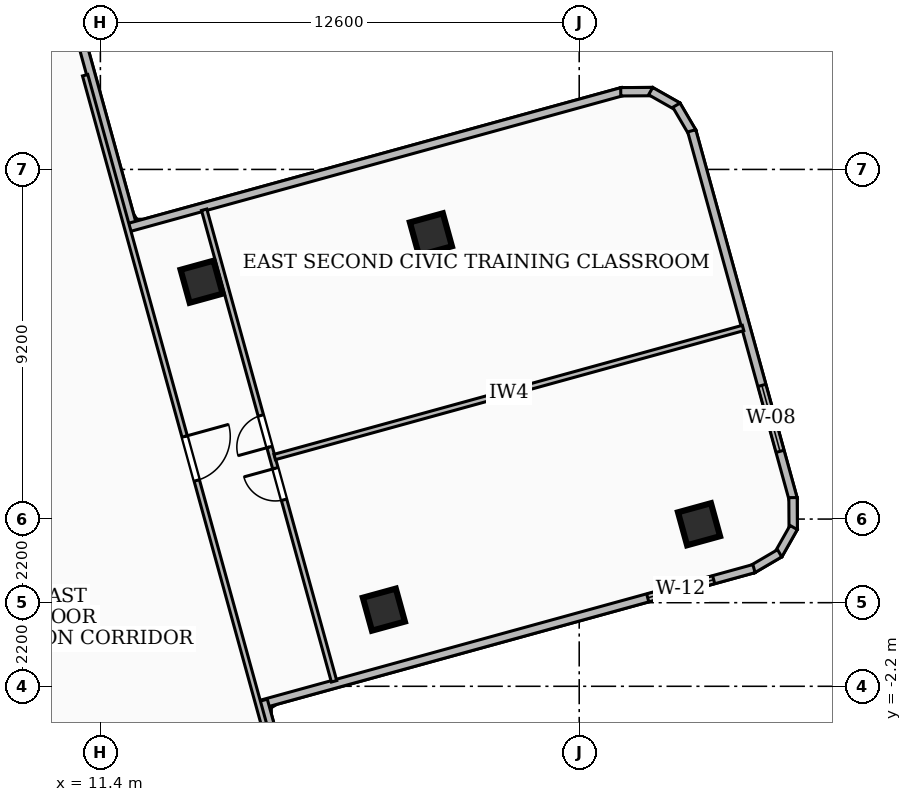
"""IFC4 building model, lengths in metres.
Left out: names, types, materials, properties, quantities, classifications, styles, units other than length and angle.
Written with IfcOpenShell. Run it as: python <this file> out.ifc"""

import sys

from ifc_helpers import new_model, si_unit, direction, frame, frame_2d, origin, origin_2d, place, context, subcontext, project, spatial, rectangle, extrude, element, fill, save


model = new_model("IFC4")
c1 = context("Model", 3, precision=1e-05, world=origin(), true_north=direction((0.0, 1.0)))
c2 = subcontext(c1, "Body", "Model", "MODEL_VIEW")
j1 = project(units=[si_unit("LENGTHUNIT", "METRE"), si_unit("PLANEANGLEUNIT", "RADIAN")], contexts=[c1])
p1 = place(None, origin())
s1 = spatial("IfcSite", under=j1, at=p1, CompositionType="ELEMENT")
p2 = place(p1, origin())
s2 = spatial("IfcBuilding", under=s1, at=p2, CompositionType="ELEMENT")
p3 = place(p2, frame((0.0, 0.0, 137.88)))
s3 = spatial("IfcBuildingStorey", under=s2, at=p3, CompositionType="ELEMENT", Elevation=137.88)
for number, where, z_axis, x_axis in (
    (1, (18.86, -0.183, 0.0), (0.0, 0.0, 1.0), (0.964, 0.266, 0.0)),
    (2, (14.064, 8.445, 0.0), (0.0, 0.0, 1.0), (0.964, 0.266, 0.0)),
    (3, (27.153, 2.064, 0.0), (0.0, 0.0, 1.0), (0.964, 0.266, 0.0)),
    (4, (20.098, 9.692, 0.0), (0.0, 0.0, 1.0), (0.964, 0.266, 0.0)),
):
    element("IfcColumn", number, at=place(p3, frame(where, z_axis=z_axis, x_axis=x_axis)), inside=s3, PredefinedType="COLUMN", context=c2, shape_type="SweptSolid", body=[
        extrude(rectangle(XDim=0.9, YDim=0.9, at=origin_2d()), origin(), (0.0, 0.0, 1.0), 3.6),
    ])
p4 = place(p3, frame((10.479, 16.33, 0.0), z_axis=(0.0, 0.0, 1.0), x_axis=(0.265567840793, -0.964092175021, 0.0)))
e5 = element("IfcWall", 5, at=p4, inside=s3, PredefinedType="SOLIDWALL", context=c2, shape_type="SweptSolid", body=[
    extrude(rectangle(XDim=6.759, YDim=0.22, at=frame_2d((3.379, 0.0))), origin(), (0.0, 0.0, 1.0), 2.624),
])
p5 = place(p3, frame((12.166, 9.876, 0.0), z_axis=(0.0, 0.0, 1.0), x_axis=(0.964099811745, 0.2655401156, 0.0)))
e6 = element("IfcWall", 6, at=p5, inside=s3, PredefinedType="SOLIDWALL", context=c2, shape_type="SweptSolid", body=[
    extrude(rectangle(XDim=13.459, YDim=0.22, at=frame_2d((6.729, 0.0))), origin(), (0.0, 0.0, 1.0), 2.624),
])
p6 = place(p3, frame((25.093, 13.443, 0.0), z_axis=(0.0, 0.0, 1.0), x_axis=(0.999982861094, 0.005854700592, 0.0)))
e7 = element("IfcWall", 7, at=p6, inside=s3, PredefinedType="SOLIDWALL", context=c2, shape_type="SweptSolid", body=[
    extrude(rectangle(XDim=0.834, YDim=0.22, at=frame_2d((0.417, 0.0))), origin(), (0.0, 0.0, 1.0), 3.32),
])
p7 = place(p3, frame((25.88, 13.46, 0.0), z_axis=(0.0, 0.0, 1.0), x_axis=(0.87005199541, -0.492959963164, 0.0)))
e8 = element("IfcWall", 8, at=p7, inside=s3, PredefinedType="SOLIDWALL", context=c2, shape_type="SweptSolid", body=[
    extrude(rectangle(XDim=0.82, YDim=0.22, at=frame_2d((0.41, 0.0))), origin(), (0.0, 0.0, 1.0), 3.32),
])
p8 = place(p3, frame((26.558, 13.09, 0.0), z_axis=(0.0, 0.0, 1.0), x_axis=(0.506432207312, -0.862279780232, 0.0)))
e9 = element("IfcWall", 9, at=p8, inside=s3, PredefinedType="SOLIDWALL", context=c2, shape_type="SweptSolid", body=[
    extrude(rectangle(XDim=0.835, YDim=0.22, at=frame_2d((0.417, 0.0))), origin(), (0.0, 0.0, 1.0), 3.32),
])
p9 = place(p3, frame((26.961, 12.416, 0.0), z_axis=(0.0, 0.0, 1.0), x_axis=(0.265584520086, -0.964087580405, 0.0)))
e10 = element("IfcWall", 10, at=p9, inside=s3, PredefinedType="SOLIDWALL", context=c2, shape_type="SweptSolid", body=[
    extrude(rectangle(XDim=10.061, YDim=0.22, at=frame_2d((5.031, 0.0))), origin(), (0.0, 0.0, 1.0), 3.32),
])
p10 = place(p9, frame((6.948, 0.0, 0.85)))
e11 = element("IfcOpeningElement", 11, at=p10, cuts=e10, PredefinedType="OPENING", context=c2, shape_type="SweptSolid", body=[
    extrude(rectangle(XDim=1.8, YDim=1.8, at=frame_2d((0.9, 0.9))), frame((0.0, 0.12, 0.0), z_axis=(0.0, -1.0, 0.0), x_axis=(1.0, 0.0, 0.0)), (0.0, 0.0, 1.0), 0.24),
])
p11 = place(p3, frame((29.626, 2.765, 0.0), z_axis=(0.0, 0.0, 1.0), x_axis=(0.006147424822, -0.999981104406, 0.0)))
e12 = element("IfcWall", 12, at=p11, inside=s3, PredefinedType="SOLIDWALL", context=c2, shape_type="SweptSolid", body=[
    extrude(rectangle(XDim=0.834, YDim=0.22, at=frame_2d((0.417, 0.0))), origin(), (0.0, 0.0, 1.0), 3.32),
])
p12 = place(p3, frame((29.643, 1.978, 0.0), z_axis=(0.0, 0.0, 1.0), x_axis=(-0.492057256668, -0.87056283872, 0.0)))
e13 = element("IfcWall", 13, at=p12, inside=s3, PredefinedType="SOLIDWALL", context=c2, shape_type="SweptSolid", body=[
    extrude(rectangle(XDim=0.819, YDim=0.22, at=frame_2d((0.41, 0.0))), origin(), (0.0, 0.0, 1.0), 3.32),
])
p13 = place(p3, frame((29.274, 1.3, 0.0), z_axis=(0.0, 0.0, 1.0), x_axis=(-0.862451814289, -0.506139178517, 0.0)))
e14 = element("IfcWall", 14, at=p13, inside=s3, PredefinedType="SOLIDWALL", context=c2, shape_type="SweptSolid", body=[
    extrude(rectangle(XDim=0.836, YDim=0.22, at=frame_2d((0.418, 0.0))), origin(), (0.0, 0.0, 1.0), 3.32),
])
p14 = place(p3, frame((28.599, 0.897, 0.0), z_axis=(0.0, 0.0, 1.0), x_axis=(-0.964113270695, -0.265491245185, 0.0)))
e15 = element("IfcWall", 15, at=p14, inside=s3, PredefinedType="SOLIDWALL", context=c2, shape_type="SweptSolid", body=[
    extrude(rectangle(XDim=13.458, YDim=0.22, at=frame_2d((6.729, 0.0))), origin(), (0.0, 0.0, 1.0), 3.32),
])
p15 = place(p14, frame((1.1, 0.0, 0.85)))
e16 = element("IfcOpeningElement", 16, at=p15, cuts=e15, PredefinedType="OPENING", context=c2, shape_type="SweptSolid", body=[
    extrude(rectangle(XDim=1.8, YDim=1.6, at=frame_2d((0.9, 0.8))), frame((0.0, 0.12, 0.0), z_axis=(0.0, -1.0, 0.0), x_axis=(1.0, 0.0, 0.0)), (0.0, 0.0, 1.0), 0.24),
])
p16 = place(p3, frame((15.686, -2.568, 0.0), z_axis=(0.0, 0.0, 1.0), x_axis=(0.265558779784, -0.964094670911, 0.0)))
e17 = element("IfcWall", 17, at=p16, inside=s3, PredefinedType="SOLIDWALL", context=c2, shape_type="SweptSolid", body=[
    extrude(rectangle(XDim=6.319, YDim=0.22, at=frame_2d((3.159, 0.0))), origin(), (0.0, 0.0, 1.0), 3.32),
])
p17 = place(p3, frame((10.999, 13.879, 0.0), z_axis=(0.0, 0.0, 1.0), x_axis=(0.26558288107, -0.964088031915, 0.0)))
e18 = element("IfcWall", 18, at=p17, inside=s3, PredefinedType="PARTITIONING", context=c2, shape_type="SweptSolid", body=[
    extrude(rectangle(XDim=20.479, YDim=0.145, at=frame_2d((10.24, 0.0))), origin(), (0.0, 0.0, 1.0), 2.55),
])
p18 = place(p17, frame((9.86, 0.0, 0.0)))
e19 = element("IfcOpeningElement", 19, at=p18, cuts=e18, PredefinedType="OPENING", context=c2, shape_type="SweptSolid", body=[
    extrude(rectangle(XDim=1.2, YDim=2.1, at=frame_2d((0.6, 1.05))), frame((0.0, 0.083, 0.0), z_axis=(0.0, -1.0, 0.0), x_axis=(1.0, 0.0, 0.0)), (0.0, 0.0, 1.0), 0.165),
])
p19 = place(p3, frame((15.986, 3.833, 0.0), z_axis=(0.0, 0.0, 1.0), x_axis=(0.964097539176, 0.265548366506, 0.0)))
e20 = element("IfcWall", 20, at=p19, inside=s3, PredefinedType="PARTITIONING", context=c2, shape_type="SweptSolid", body=[
    extrude(rectangle(XDim=12.785, YDim=0.145, at=frame_2d((6.393, 0.0))), origin(), (0.0, 0.0, 1.0), 2.812),
])
p20 = place(p3, frame((17.549, -2.069, 0.0), z_axis=(0.0, 0.0, 1.0), x_axis=(-0.265569130282, 0.964091819819, 0.0)))
e21 = element("IfcWall", 21, at=p20, inside=s3, PredefinedType="PARTITIONING", context=c2, shape_type="SweptSolid", body=[
    extrude(rectangle(XDim=12.87, YDim=0.145, at=frame_2d((6.435, 0.0))), origin(), (0.0, 0.0, 1.0), 2.55),
])
p21 = place(p20, frame((4.955, 0.0, 0.0)))
e22 = element("IfcOpeningElement", 22, at=p21, cuts=e21, PredefinedType="OPENING", context=c2, shape_type="SweptSolid", body=[
    extrude(rectangle(XDim=0.86, YDim=2.04, at=frame_2d((0.43, 1.02))), frame((0.0, 0.083, 0.0), z_axis=(0.0, -1.0, 0.0), x_axis=(1.0, 0.0, 0.0)), (0.0, 0.0, 1.0), 0.165),
])
p22 = place(p20, frame((6.395, 0.0, 0.0)))
e23 = element("IfcOpeningElement", 23, at=p22, cuts=e21, PredefinedType="OPENING", context=c2, shape_type="SweptSolid", body=[
    extrude(rectangle(XDim=0.86, YDim=2.04, at=frame_2d((0.43, 1.02))), frame((0.0, 0.083, 0.0), z_axis=(0.0, -1.0, 0.0), x_axis=(1.0, 0.0, 0.0)), (0.0, 0.0, 1.0), 0.165),
])
p23 = place(p10, origin())
e24 = element("IfcWindow", 24, at=p23, inside=s3, PartitioningType="SINGLE_PANEL", PredefinedType="WINDOW", context=c2, shape_type="SweptSolid", body=[
    extrude(rectangle(XDim=1.8, YDim=1.8, at=frame_2d((0.9, 0.9))), frame((0.0, 0.03, 0.0), z_axis=(0.0, -1.0, 0.0), x_axis=(1.0, 0.0, 0.0)), (0.0, 0.0, 1.0), 0.06),
])
fill(e11, e24)
p24 = place(p15, origin())
e25 = element("IfcWindow", 25, at=p24, inside=s3, PartitioningType="SINGLE_PANEL", PredefinedType="WINDOW", context=c2, shape_type="SweptSolid", body=[
    extrude(rectangle(XDim=1.8, YDim=1.6, at=frame_2d((0.9, 0.8))), frame((0.0, 0.03, 0.0), z_axis=(0.0, -1.0, 0.0), x_axis=(1.0, 0.0, 0.0)), (0.0, 0.0, 1.0), 0.06),
])
fill(e16, e25)
p25 = place(p18, origin())
e26 = element("IfcDoor", 26, at=p25, inside=s3, OperationType="SINGLE_SWING_LEFT", PredefinedType="DOOR", context=c2, shape_type="SweptSolid", body=[
    extrude(rectangle(XDim=1.2, YDim=2.1, at=frame_2d((0.6, 1.05))), frame((0.0, 0.025, 0.0), z_axis=(0.0, -1.0, 0.0), x_axis=(1.0, 0.0, 0.0)), (0.0, 0.0, 1.0), 0.05),
])
fill(e19, e26)
p26 = place(p21, origin())
e27 = element("IfcDoor", 27, at=p26, inside=s3, OperationType="SINGLE_SWING_RIGHT", PredefinedType="DOOR", context=c2, shape_type="SweptSolid", body=[
    extrude(rectangle(XDim=0.86, YDim=2.04, at=frame_2d((0.43, 1.02))), frame((0.0, 0.025, 0.0), z_axis=(0.0, -1.0, 0.0), x_axis=(1.0, 0.0, 0.0)), (0.0, 0.0, 1.0), 0.05),
])
fill(e22, e27)
p27 = place(p22, origin())
e28 = element("IfcDoor", 28, at=p27, inside=s3, OperationType="SINGLE_SWING_LEFT", PredefinedType="DOOR", context=c2, shape_type="SweptSolid", body=[
    extrude(rectangle(XDim=0.86, YDim=2.04, at=frame_2d((0.43, 1.02))), frame((0.0, 0.025, 0.0), z_axis=(0.0, -1.0, 0.0), x_axis=(1.0, 0.0, 0.0)), (0.0, 0.0, 1.0), 0.05),
])
fill(e23, e28)
save(model, sys.argv[1])
